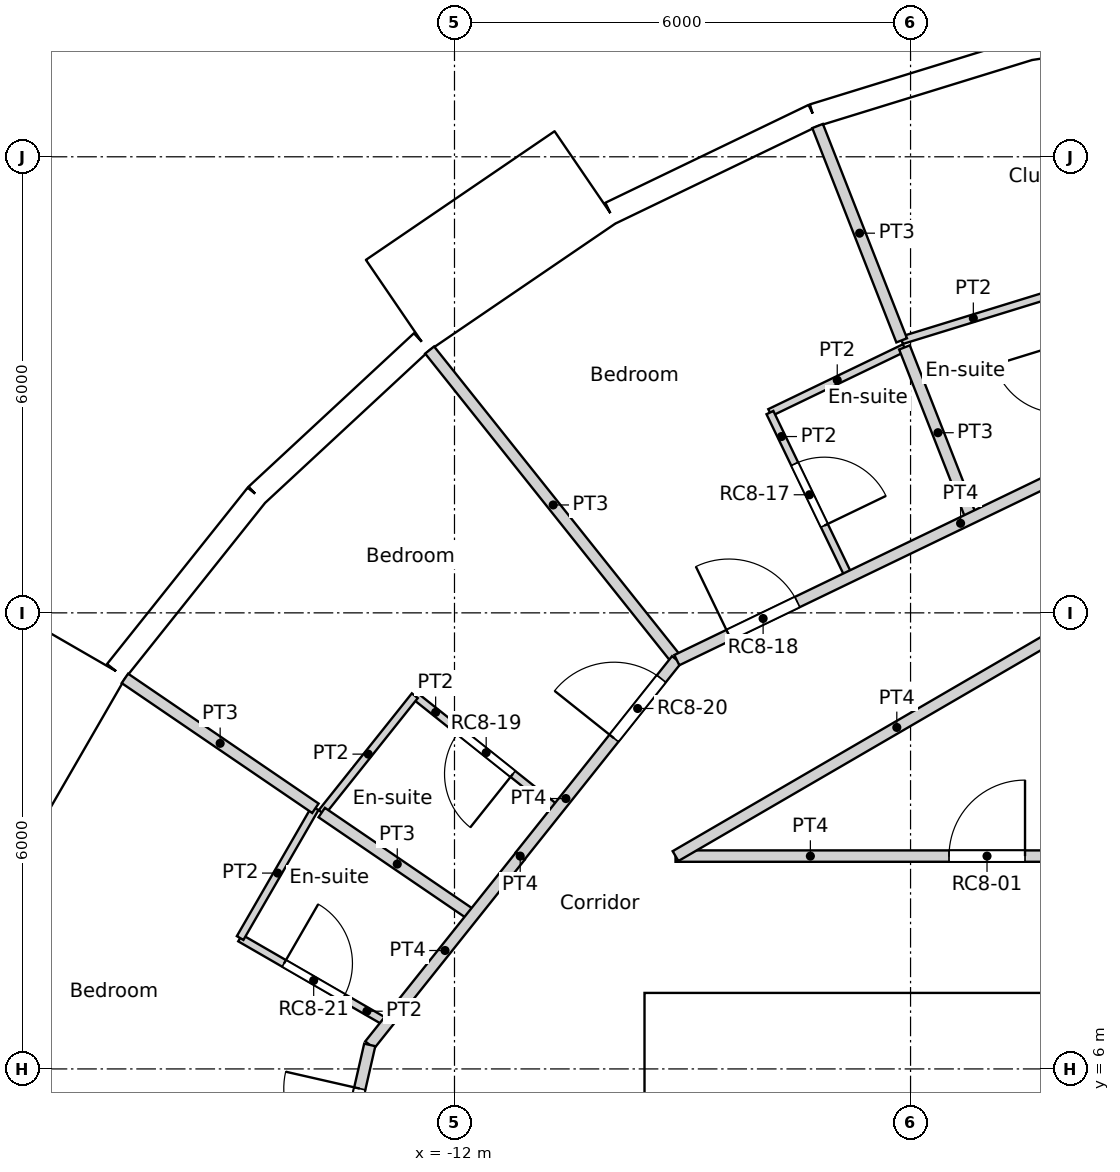
"""IFC4 building model, lengths in metres.
Left out: names, types, materials, properties, quantities, classifications, styles, units other than length and angle.
Written with IfcOpenShell. Run it as: python <this file> out.ifc"""

import sys

from ifc_helpers import new_model, si_unit, direction, frame, frame_2d, origin, origin_2d, place, context, subcontext, project, spatial, rectangle, circle, extrude, element, fill, save


model = new_model("IFC4")
c1 = context("Model", 3, precision=1e-05, world=origin(), true_north=direction((0.0, 1.0)))
c2 = subcontext(c1, "Body", "Model", "MODEL_VIEW")
j1 = project(units=[si_unit("LENGTHUNIT", "METRE"), si_unit("PLANEANGLEUNIT", "RADIAN")], contexts=[c1])
p1 = place(None, origin())
s1 = spatial("IfcSite", under=j1, at=p1, CompositionType="ELEMENT")
p2 = place(p1, origin())
s2 = spatial("IfcBuilding", under=s1, at=p2, CompositionType="ELEMENT")
p3 = place(p2, frame((0.0, 0.0, 305.4)))
s3 = spatial("IfcBuildingStorey", under=s2, at=p3, CompositionType="ELEMENT", Elevation=305.4)
for number, where, z_axis, x_axis in (
    (1, (-4.188, 18.35, 0.0), (0.0, 0.0, 1.0), (1.0, 0.0, 0.0)),
    (2, (-9.411, 16.301, 0.0), (0.0, 0.0, 1.0), (1.0, 0.0, 0.0)),
    (3, (-13.798, 12.802, 0.0), (0.0, 0.0, 1.0), (1.0, 0.0, 0.0)),
    (4, (-16.958, 8.167, 0.0), (0.0, 0.0, 1.0), (1.0, 0.0, 0.0)),
):
    element("IfcColumn", number, at=place(p3, frame(where, z_axis=z_axis, x_axis=x_axis)), inside=s3, PredefinedType="COLUMN", context=c2, shape_type="SweptSolid", body=[
        extrude(circle(Radius=0.45, at=origin_2d()), origin(), (0.0, 0.0, 1.0), 3.6),
    ])
p4 = place(p3, frame((-1.563, 20.436, -0.35), z_axis=(0.0, 0.0, 1.0), x_axis=(-0.988836445254, -0.149004981587, 0.0)))
e5 = element("IfcWall", 5, at=p4, inside=s3, PredefinedType="ELEMENTEDWALL", context=c2, shape_type="SweptSolid", body=[
    extrude(rectangle(XDim=3.0, YDim=1.45, at=frame_2d((1.5, 0.0))), origin(), (0.0, 0.0, 1.0), 3.6),
])
p5 = place(p4, frame((1.5, 0.0, 1.9)))
e6 = element("IfcOpeningElement", 6, at=p5, cuts=e5, PredefinedType="OPENING", context=c2, shape_type="SweptSolid", body=[
    extrude(circle(Radius=0.9, at=origin_2d()), frame((0.0, 0.735, 0.0), z_axis=(0.0, -1.0, 0.0), x_axis=(1.0, 0.0, 0.0)), (0.0, 0.0, 1.0), 1.47),
])
p6 = place(p3, frame((-4.448, 19.418, 0.0), z_axis=(0.0, 0.0, 1.0), x_axis=(-0.95558635705, -0.294711238707, 0.0)))
e7 = element("IfcWall", 7, at=p6, inside=s3, PredefinedType="SOLIDWALL", context=c2, shape_type="SweptSolid", body=[
    extrude(rectangle(XDim=2.962, YDim=0.3, at=frame_2d((1.481, 0.0))), origin(), (0.0, 0.0, 1.0), 2.8),
])
p7 = place(p6, frame((1.481, 0.0, 1.55)))
e8 = element("IfcOpeningElement", 8, at=p7, cuts=e7, PredefinedType="OPENING", context=c2, shape_type="SweptSolid", body=[
    extrude(circle(Radius=0.9, at=origin_2d()), frame((0.0, 0.16, 0.0), z_axis=(0.0, -1.0, 0.0), x_axis=(1.0, 0.0, 0.0)), (0.0, 0.0, 1.0), 0.32),
])
p8 = place(p3, frame((-7.278, 18.545, 0.0), z_axis=(0.0, 0.0, 1.0), x_axis=(-0.900939615635, -0.433944476838, 0.0)))
e9 = element("IfcWall", 9, at=p8, inside=s3, PredefinedType="SOLIDWALL", context=c2, shape_type="SweptSolid", body=[
    extrude(rectangle(XDim=2.962, YDim=0.3, at=frame_2d((1.481, 0.0))), origin(), (0.0, 0.0, 1.0), 3.25),
])
p9 = place(p8, frame((1.481, 0.0, 1.55)))
e10 = element("IfcOpeningElement", 10, at=p9, cuts=e9, PredefinedType="OPENING", context=c2, shape_type="SweptSolid", body=[
    extrude(circle(Radius=0.9, at=origin_2d()), frame((0.0, 0.16, 0.0), z_axis=(0.0, -1.0, 0.0), x_axis=(1.0, 0.0, 0.0)), (0.0, 0.0, 1.0), 0.32),
])
p10 = place(p3, frame((-10.275, 17.734, -0.35), z_axis=(0.0, 0.0, 1.0), x_axis=(-0.826246281157, -0.563309047392, 0.0)))
e11 = element("IfcWall", 11, at=p10, inside=s3, PredefinedType="ELEMENTEDWALL", context=c2, shape_type="SweptSolid", body=[
    extrude(rectangle(XDim=3.0, YDim=1.45, at=frame_2d((1.5, 0.0))), origin(), (0.0, 0.0, 1.0), 3.6),
])
p11 = place(p10, frame((1.5, 0.0, 1.9)))
e12 = element("IfcOpeningElement", 12, at=p11, cuts=e11, PredefinedType="OPENING", context=c2, shape_type="SweptSolid", body=[
    extrude(circle(Radius=0.9, at=origin_2d()), frame((0.0, 0.735, 0.0), z_axis=(0.0, -1.0, 0.0), x_axis=(1.0, 0.0, 0.0)), (0.0, 0.0, 1.0), 1.47),
])
p12 = place(p3, frame((-12.432, 15.565, 0.0), z_axis=(0.0, 0.0, 1.0), x_axis=(-0.733066412643, -0.680157066165, 0.0)))
e13 = element("IfcWall", 13, at=p12, inside=s3, PredefinedType="SOLIDWALL", context=c2, shape_type="SweptSolid", body=[
    extrude(rectangle(XDim=2.962, YDim=0.3, at=frame_2d((1.481, 0.0))), origin(), (0.0, 0.0, 1.0), 2.8),
])
p13 = place(p12, frame((1.481, 0.0, 1.55)))
e14 = element("IfcOpeningElement", 14, at=p13, cuts=e13, PredefinedType="OPENING", context=c2, shape_type="SweptSolid", body=[
    extrude(circle(Radius=0.9, at=origin_2d()), frame((0.0, 0.16, 0.0), z_axis=(0.0, -1.0, 0.0), x_axis=(1.0, 0.0, 0.0)), (0.0, 0.0, 1.0), 0.32),
])
p14 = place(p3, frame((-14.604, 13.55, 0.0), z_axis=(0.0, 0.0, 1.0), x_axis=(-0.623498236992, -0.781824755599, 0.0)))
e15 = element("IfcWall", 15, at=p14, inside=s3, PredefinedType="SOLIDWALL", context=c2, shape_type="SweptSolid", body=[
    extrude(rectangle(XDim=2.962, YDim=0.3, at=frame_2d((1.481, 0.0))), origin(), (0.0, 0.0, 1.0), 3.25),
])
p15 = place(p14, frame((1.481, 0.0, 1.55)))
e16 = element("IfcOpeningElement", 16, at=p15, cuts=e15, PredefinedType="OPENING", context=c2, shape_type="SweptSolid", body=[
    extrude(circle(Radius=0.9, at=origin_2d()), frame((0.0, 0.16, 0.0), z_axis=(0.0, -1.0, 0.0), x_axis=(1.0, 0.0, 0.0)), (0.0, 0.0, 1.0), 0.32),
])
p16 = place(p3, frame((-16.952, 11.52, -0.35), z_axis=(0.0, 0.0, 1.0), x_axis=(-0.499990139034, -0.866031096941, 0.0)))
e17 = element("IfcWall", 17, at=p16, inside=s3, PredefinedType="ELEMENTEDWALL", context=c2, shape_type="SweptSolid", body=[
    extrude(rectangle(XDim=3.0, YDim=1.45, at=frame_2d((1.5, 0.0))), origin(), (0.0, 0.0, 1.0), 3.6),
])
p17 = place(p16, frame((1.5, 0.0, 1.9)))
e18 = element("IfcOpeningElement", 18, at=p17, cuts=e17, PredefinedType="OPENING", context=c2, shape_type="SweptSolid", body=[
    extrude(circle(Radius=0.9, at=origin_2d()), frame((0.0, 0.735, 0.0), z_axis=(0.0, -1.0, 0.0), x_axis=(1.0, 0.0, 0.0)), (0.0, 0.0, 1.0), 1.47),
])
p18 = place(p3, frame((-9.5, 6.7, 0.0), z_axis=(0.0, 0.0, 1.0), x_axis=(1.0, 0.0, 0.0)))
e19 = element("IfcWall", 19, at=p18, inside=s3, PredefinedType="SOLIDWALL", context=c2, shape_type="SweptSolid", body=[
    extrude(rectangle(XDim=19.0, YDim=0.6, at=frame_2d((9.5, 0.0))), origin(), (0.0, 0.0, 1.0), 3.6),
])
p19 = place(p18, frame((5.35, 0.0, 0.0)))
e20 = element("IfcOpeningElement", 20, at=p19, cuts=e19, PredefinedType="OPENING", context=c2, shape_type="SweptSolid", body=[
    extrude(rectangle(XDim=1.7, YDim=2.1, at=frame_2d((0.85, 1.05))), frame((0.0, 0.3, 0.0), z_axis=(0.0, -1.0, 0.0), x_axis=(1.0, 0.0, 0.0)), (0.0, 0.0, 1.0), 0.6),
])
p20 = place(p3, frame((-9.2, -6.4, 0.0), z_axis=(0.0, 0.0, 1.0), x_axis=(0.0, 1.0, 0.0)))
e21 = element("IfcWall", 21, at=p20, inside=s3, PredefinedType="SOLIDWALL", context=c2, shape_type="SweptSolid", body=[
    extrude(rectangle(XDim=12.8, YDim=0.6, at=frame_2d((6.4, 0.0))), origin(), (0.0, 0.0, 1.0), 3.6),
])
p21 = place(p3, frame((-9.092, 8.8, 0.0), z_axis=(0.0, 0.0, 1.0), x_axis=(0.864470922103, 0.502682827277, 0.0)))
e22 = element("IfcWall", 22, at=p21, inside=s3, PredefinedType="PARTITIONING", context=c2, shape_type="SweptSolid", body=[
    extrude(rectangle(XDim=6.735, YDim=0.15, at=frame_2d((3.368, 0.0))), origin(), (0.0, 0.0, 1.0), 3.25),
])
p22 = place(p3, frame((-9.092, 8.8, 0.0), z_axis=(0.0, 0.0, 1.0), x_axis=(1.0, 0.0, 0.0)))
e23 = element("IfcWall", 23, at=p22, inside=s3, PredefinedType="PARTITIONING", context=c2, shape_type="SweptSolid", body=[
    extrude(rectangle(XDim=8.196, YDim=0.15, at=frame_2d((4.098, 0.0))), origin(), (0.0, 0.0, 1.0), 3.25),
])
p23 = place(p22, frame((3.598, 0.0, 0.0)))
e24 = element("IfcOpeningElement", 24, at=p23, cuts=e23, PredefinedType="OPENING", context=c2, shape_type="SweptSolid", body=[
    extrude(rectangle(XDim=1.0, YDim=2.04, at=frame_2d((0.5, 1.02))), frame((0.0, 0.075, 0.0), z_axis=(0.0, -1.0, 0.0), x_axis=(1.0, 0.0, 0.0)), (0.0, 0.0, 1.0), 0.15),
])
p24 = place(p3, frame((-11.136, 8.802, 0.0), z_axis=(0.0, 0.0, 1.0), x_axis=(0.623151397235, 0.782101231379, 0.0)))
e25 = element("IfcWall", 25, at=p24, inside=s3, PredefinedType="PARTITIONING", context=c2, shape_type="SweptSolid", body=[
    extrude(rectangle(XDim=3.301, YDim=0.15, at=frame_2d((1.65, 0.0))), origin(), (0.0, 0.0, 1.0), 3.25),
])
p25 = place(p24, frame((1.981, 0.0, 0.0)))
e26 = element("IfcOpeningElement", 26, at=p25, cuts=e25, PredefinedType="OPENING", context=c2, shape_type="SweptSolid", body=[
    extrude(rectangle(XDim=1.0, YDim=2.1, at=frame_2d((0.5, 1.05))), frame((0.0, 0.075, 0.0), z_axis=(0.0, -1.0, 0.0), x_axis=(1.0, 0.0, 0.0)), (0.0, 0.0, 1.0), 0.15),
])
p26 = place(p3, frame((-11.134, 8.8, 0.0), z_axis=(0.0, 0.0, 1.0), x_axis=(-1.0, 0.0, 0.0)))
e27 = element("IfcWall", 27, at=p26, inside=s3, PredefinedType="PARTITIONING", context=c2, shape_type="SweptSolid", body=[
    extrude(rectangle(XDim=0.003, YDim=0.15, at=frame_2d((0.001, 0.0))), origin(), (0.0, 0.0, 1.0), 3.25),
])
p27 = place(p3, frame((-9.075, 11.378, 0.0), z_axis=(0.0, 0.0, 1.0), x_axis=(0.900778421649, 0.434278983018, 0.0)))
e28 = element("IfcWall", 28, at=p27, inside=s3, PredefinedType="PARTITIONING", context=c2, shape_type="SweptSolid", body=[
    extrude(rectangle(XDim=6.479, YDim=0.15, at=frame_2d((3.239, 0.0))), origin(), (0.0, 0.0, 1.0), 3.25),
])
p28 = place(p27, frame((0.76, 0.0, 0.0)))
e29 = element("IfcOpeningElement", 29, at=p28, cuts=e28, PredefinedType="OPENING", context=c2, shape_type="SweptSolid", body=[
    extrude(rectangle(XDim=1.0, YDim=2.1, at=frame_2d((0.5, 1.05))), frame((0.0, 0.075, 0.0), z_axis=(0.0, -1.0, 0.0), x_axis=(1.0, 0.0, 0.0)), (0.0, 0.0, 1.0), 0.15),
])
p29 = place(p3, frame((-13.115, 6.316, 0.0), z_axis=(0.0, 0.0, 1.0), x_axis=(0.623560523309, 0.781775078761, 0.0)))
e30 = element("IfcWall", 30, at=p29, inside=s3, PredefinedType="PARTITIONING", context=c2, shape_type="SweptSolid", body=[
    extrude(rectangle(XDim=3.177, YDim=0.15, at=frame_2d((1.589, 0.0))), origin(), (0.0, 0.0, 1.0), 3.25),
])
p30 = place(p3, frame((-14.557, 0.0, 0.0), z_axis=(0.0, 0.0, 1.0), x_axis=(0.222533159771, 0.974925121639, 0.0)))
e31 = element("IfcWall", 31, at=p30, inside=s3, PredefinedType="PARTITIONING", context=c2, shape_type="SweptSolid", body=[
    extrude(rectangle(XDim=6.478, YDim=0.15, at=frame_2d((3.239, 0.0))), origin(), (0.0, 0.0, 1.0), 3.25),
])
p31 = place(p30, frame((4.889, 0.0, 0.0)))
e32 = element("IfcOpeningElement", 32, at=p31, cuts=e31, PredefinedType="OPENING", context=c2, shape_type="SweptSolid", body=[
    extrude(rectangle(XDim=1.0, YDim=2.1, at=frame_2d((0.5, 1.05))), frame((0.0, 0.075, 0.0), z_axis=(0.0, -1.0, 0.0), x_axis=(1.0, 0.0, 0.0)), (0.0, 0.0, 1.0), 0.15),
])
p32 = place(p30, frame((2.567, 0.0, 0.0)))
e33 = element("IfcOpeningElement", 33, at=p32, cuts=e31, PredefinedType="OPENING", context=c2, shape_type="SweptSolid", body=[
    extrude(rectangle(XDim=1.0, YDim=2.1, at=frame_2d((0.5, 1.05))), frame((0.0, 0.075, 0.0), z_axis=(0.0, -1.0, 0.0), x_axis=(1.0, 0.0, 0.0)), (0.0, 0.0, 1.0), 0.15),
])
p33 = place(p3, frame((-6.117, 15.585, 0.0), z_axis=(0.0, 0.0, 1.0), x_axis=(0.955671951668, 0.294433559219, 0.0)))
e34 = element("IfcWall", 34, at=p33, inside=s3, PredefinedType="PARTITIONING", context=c2, shape_type="SweptSolid", body=[
    extrude(rectangle(XDim=1.973, YDim=0.1, at=frame_2d((0.987, 0.0))), origin(), (0.0, 0.0, 1.0), 3.25),
])
p34 = place(p3, frame((-7.223, 18.405, 0.0), z_axis=(0.0, 0.0, 1.0), x_axis=(0.365101225584, -0.93096782709, 0.0)))
e35 = element("IfcWall", 35, at=p34, inside=s3, PredefinedType="PARTITIONING", context=c2, shape_type="SweptSolid", body=[
    extrude(rectangle(XDim=3.029, YDim=0.15, at=frame_2d((1.515, 0.0))), origin(), (0.0, 0.0, 1.0), 3.25),
])
p35 = place(p3, frame((-6.08, 15.492, 0.0), z_axis=(0.0, 0.0, 1.0), x_axis=(0.36549883342, -0.930811797717, 0.0)))
e36 = element("IfcWall", 36, at=p35, inside=s3, PredefinedType="PARTITIONING", context=c2, shape_type="SweptSolid", body=[
    extrude(rectangle(XDim=2.411, YDim=0.15, at=frame_2d((1.205, 0.0))), origin(), (0.0, 0.0, 1.0), 3.25),
])
p36 = place(p3, frame((-7.85, 14.635, 0.0), z_axis=(0.0, 0.0, 1.0), x_axis=(0.900936932599, 0.433950047216, 0.0)))
e37 = element("IfcWall", 37, at=p36, inside=s3, PredefinedType="PARTITIONING", context=c2, shape_type="SweptSolid", body=[
    extrude(rectangle(XDim=1.966, YDim=0.1, at=frame_2d((0.983, 0.0))), origin(), (0.0, 0.0, 1.0), 3.25),
])
p37 = place(p3, frame((-7.85, 14.635, 0.0), z_axis=(0.0, 0.0, 1.0), x_axis=(0.433815618773, -0.901001669759, 0.0)))
e38 = element("IfcWall", 38, at=p37, inside=s3, PredefinedType="PARTITIONING", context=c2, shape_type="SweptSolid", body=[
    extrude(rectangle(XDim=2.4, YDim=0.1, at=frame_2d((1.2, 0.0))), origin(), (0.0, 0.0, 1.0), 3.25),
])
p38 = place(p37, frame((0.75, 0.0, 0.0)))
e39 = element("IfcOpeningElement", 39, at=p38, cuts=e38, PredefinedType="OPENING", context=c2, shape_type="SweptSolid", body=[
    extrude(rectangle(XDim=0.9, YDim=2.04, at=frame_2d((0.45, 1.02))), frame((0.0, 0.05, 0.0), z_axis=(0.0, -1.0, 0.0), x_axis=(1.0, 0.0, 0.0)), (0.0, 0.0, 1.0), 0.1),
])
p39 = place(p3, frame((-12.327, 15.458, 0.0), z_axis=(0.0, 0.0, 1.0), x_axis=(0.623460949534, -0.781854490558, 0.0)))
e40 = element("IfcWall", 40, at=p39, inside=s3, PredefinedType="PARTITIONING", context=c2, shape_type="SweptSolid", body=[
    extrude(rectangle(XDim=5.214, YDim=0.15, at=frame_2d((2.607, 0.0))), origin(), (0.0, 0.0, 1.0), 3.25),
])
p40 = place(p3, frame((-12.522, 10.91, 0.0), z_axis=(0.0, 0.0, 1.0), x_axis=(0.781830263661, -0.623491330191, 0.0)))
e41 = element("IfcWall", 41, at=p40, inside=s3, PredefinedType="PARTITIONING", context=c2, shape_type="SweptSolid", body=[
    extrude(rectangle(XDim=2.401, YDim=0.1, at=frame_2d((1.2, 0.0))), origin(), (0.0, 0.0, 1.0), 3.25),
])
p41 = place(p40, frame((0.751, 0.0, 0.0)))
e42 = element("IfcOpeningElement", 42, at=p41, cuts=e41, PredefinedType="OPENING", context=c2, shape_type="SweptSolid", body=[
    extrude(rectangle(XDim=0.9, YDim=2.04, at=frame_2d((0.45, 1.02))), frame((0.0, 0.05, 0.0), z_axis=(0.0, -1.0, 0.0), x_axis=(1.0, 0.0, 0.0)), (0.0, 0.0, 1.0), 0.1),
])
p42 = place(p3, frame((-13.747, 9.373, 0.0), z_axis=(0.0, 0.0, 1.0), x_axis=(0.623330716607, 0.781958322249, 0.0)))
e43 = element("IfcWall", 43, at=p42, inside=s3, PredefinedType="PARTITIONING", context=c2, shape_type="SweptSolid", body=[
    extrude(rectangle(XDim=1.965, YDim=0.1, at=frame_2d((0.983, 0.0))), origin(), (0.0, 0.0, 1.0), 3.25),
])
p43 = place(p3, frame((-16.336, 11.138, 0.0), z_axis=(0.0, 0.0, 1.0), x_axis=(0.826159220299, -0.563436724678, 0.0)))
e44 = element("IfcWall", 44, at=p43, inside=s3, PredefinedType="PARTITIONING", context=c2, shape_type="SweptSolid", body=[
    extrude(rectangle(XDim=3.033, YDim=0.15, at=frame_2d((1.517, 0.0))), origin(), (0.0, 0.0, 1.0), 3.25),
])
p44 = place(p3, frame((-13.747, 9.373, 0.0), z_axis=(0.0, 0.0, 1.0), x_axis=(0.826135036312, -0.563472183677, 0.0)))
e45 = element("IfcWall", 45, at=p44, inside=s3, PredefinedType="PARTITIONING", context=c2, shape_type="SweptSolid", body=[
    extrude(rectangle(XDim=2.406, YDim=0.15, at=frame_2d((1.203, 0.0))), origin(), (0.0, 0.0, 1.0), 3.25),
])
p45 = place(p3, frame((-14.82, 7.722, 0.0), z_axis=(0.0, 0.0, 1.0), x_axis=(0.500143626598, 0.865942465048, 0.0)))
e46 = element("IfcWall", 46, at=p45, inside=s3, PredefinedType="PARTITIONING", context=c2, shape_type="SweptSolid", body=[
    extrude(rectangle(XDim=1.974, YDim=0.1, at=frame_2d((0.987, 0.0))), origin(), (0.0, 0.0, 1.0), 3.25),
])
p46 = place(p3, frame((-14.82, 7.722, 0.0), z_axis=(0.0, 0.0, 1.0), x_axis=(0.866076416361, -0.499911633214, 0.0)))
e47 = element("IfcWall", 47, at=p46, inside=s3, PredefinedType="PARTITIONING", context=c2, shape_type="SweptSolid", body=[
    extrude(rectangle(XDim=2.234, YDim=0.1, at=frame_2d((1.117, 0.0))), origin(), (0.0, 0.0, 1.0), 3.25),
])
p47 = place(p46, frame((0.667, 0.0, 0.0)))
e48 = element("IfcOpeningElement", 48, at=p47, cuts=e47, PredefinedType="OPENING", context=c2, shape_type="SweptSolid", body=[
    extrude(rectangle(XDim=0.9, YDim=2.04, at=frame_2d((0.45, 1.02))), frame((0.0, 0.05, 0.0), z_axis=(0.0, -1.0, 0.0), x_axis=(1.0, 0.0, 0.0)), (0.0, 0.0, 1.0), 0.1),
])
p48 = place(p3, frame((-18.893, 5.828, 0.0), z_axis=(0.0, 0.0, 1.0), x_axis=(0.955580602693, -0.294729896274, 0.0)))
e49 = element("IfcWall", 49, at=p48, inside=s3, PredefinedType="PARTITIONING", context=c2, shape_type="SweptSolid", body=[
    extrude(rectangle(XDim=5.54, YDim=0.15, at=frame_2d((2.77, 0.0))), origin(), (0.0, 0.0, 1.0), 3.25),
])
p49 = place(p7, origin())
e50 = element("IfcWindow", 50, at=p49, inside=s3, PartitioningType="SINGLE_PANEL", PredefinedType="WINDOW", context=c2, shape_type="SweptSolid", body=[
    extrude(circle(Radius=0.9, at=origin_2d()), frame((0.0, 0.12, 0.0), z_axis=(0.0, -1.0, 0.0), x_axis=(1.0, 0.0, 0.0)), (0.0, 0.0, 1.0), 0.1),
])
fill(e8, e50)
p50 = place(p9, origin())
e51 = element("IfcWindow", 51, at=p50, inside=s3, PartitioningType="SINGLE_PANEL", PredefinedType="WINDOW", context=c2, shape_type="SweptSolid", body=[
    extrude(circle(Radius=0.9, at=origin_2d()), frame((0.0, 0.12, 0.0), z_axis=(0.0, -1.0, 0.0), x_axis=(1.0, 0.0, 0.0)), (0.0, 0.0, 1.0), 0.1),
])
fill(e10, e51)
p51 = place(p11, origin())
e52 = element("IfcWindow", 52, at=p51, inside=s3, PartitioningType="SINGLE_PANEL", PredefinedType="WINDOW", context=c2, shape_type="SweptSolid", body=[
    extrude(circle(Radius=0.9, at=origin_2d()), frame((0.0, 0.695, 0.0), z_axis=(0.0, -1.0, 0.0), x_axis=(1.0, 0.0, 0.0)), (0.0, 0.0, 1.0), 0.1),
])
fill(e12, e52)
p52 = place(p13, origin())
e53 = element("IfcWindow", 53, at=p52, inside=s3, PartitioningType="SINGLE_PANEL", PredefinedType="WINDOW", context=c2, shape_type="SweptSolid", body=[
    extrude(circle(Radius=0.9, at=origin_2d()), frame((0.0, 0.12, 0.0), z_axis=(0.0, -1.0, 0.0), x_axis=(1.0, 0.0, 0.0)), (0.0, 0.0, 1.0), 0.1),
])
fill(e14, e53)
p53 = place(p15, origin())
e54 = element("IfcWindow", 54, at=p53, inside=s3, PartitioningType="SINGLE_PANEL", PredefinedType="WINDOW", context=c2, shape_type="SweptSolid", body=[
    extrude(circle(Radius=0.9, at=origin_2d()), frame((0.0, 0.12, 0.0), z_axis=(0.0, -1.0, 0.0), x_axis=(1.0, 0.0, 0.0)), (0.0, 0.0, 1.0), 0.1),
])
fill(e16, e54)
p54 = place(p17, origin())
e55 = element("IfcWindow", 55, at=p54, inside=s3, PartitioningType="SINGLE_PANEL", PredefinedType="WINDOW", context=c2, shape_type="SweptSolid", body=[
    extrude(circle(Radius=0.9, at=origin_2d()), frame((0.0, 0.695, 0.0), z_axis=(0.0, -1.0, 0.0), x_axis=(1.0, 0.0, 0.0)), (0.0, 0.0, 1.0), 0.1),
])
fill(e18, e55)
p55 = place(p23, origin())
e56 = element("IfcDoor", 56, at=p55, inside=s3, OperationType="SINGLE_SWING_RIGHT", PredefinedType="DOOR", context=c2, shape_type="SweptSolid", body=[
    extrude(rectangle(XDim=1.0, YDim=2.04, at=frame_2d((0.5, 1.02))), frame((0.0, 0.025, 0.0), z_axis=(0.0, -1.0, 0.0), x_axis=(1.0, 0.0, 0.0)), (0.0, 0.0, 1.0), 0.05),
])
fill(e24, e56)
p56 = place(p38, origin())
e57 = element("IfcDoor", 57, at=p56, inside=s3, OperationType="SINGLE_SWING_RIGHT", PredefinedType="DOOR", context=c2, shape_type="SweptSolid", body=[
    extrude(rectangle(XDim=0.9, YDim=2.04, at=frame_2d((0.45, 1.02))), frame((0.0, 0.025, 0.0), z_axis=(0.0, -1.0, 0.0), x_axis=(1.0, 0.0, 0.0)), (0.0, 0.0, 1.0), 0.05),
])
fill(e39, e57)
p57 = place(p28, origin())
e58 = element("IfcDoor", 58, at=p57, inside=s3, OperationType="SINGLE_SWING_LEFT", PredefinedType="DOOR", context=c2, shape_type="SweptSolid", body=[
    extrude(rectangle(XDim=1.0, YDim=2.1, at=frame_2d((0.5, 1.05))), frame((0.0, 0.025, 0.0), z_axis=(0.0, -1.0, 0.0), x_axis=(1.0, 0.0, 0.0)), (0.0, 0.0, 1.0), 0.05),
])
fill(e29, e58)
p58 = place(p41, origin())
e59 = element("IfcDoor", 59, at=p58, inside=s3, OperationType="SINGLE_SWING_LEFT", PredefinedType="DOOR", context=c2, shape_type="SweptSolid", body=[
    extrude(rectangle(XDim=0.9, YDim=2.04, at=frame_2d((0.45, 1.02))), frame((0.0, 0.025, 0.0), z_axis=(0.0, -1.0, 0.0), x_axis=(1.0, 0.0, 0.0)), (0.0, 0.0, 1.0), 0.05),
])
fill(e42, e59)
p59 = place(p25, origin())
e60 = element("IfcDoor", 60, at=p59, inside=s3, OperationType="SINGLE_SWING_LEFT", PredefinedType="DOOR", context=c2, shape_type="SweptSolid", body=[
    extrude(rectangle(XDim=1.0, YDim=2.1, at=frame_2d((0.5, 1.05))), frame((0.0, 0.025, 0.0), z_axis=(0.0, -1.0, 0.0), x_axis=(1.0, 0.0, 0.0)), (0.0, 0.0, 1.0), 0.05),
])
fill(e26, e60)
p60 = place(p47, origin())
e61 = element("IfcDoor", 61, at=p60, inside=s3, OperationType="SINGLE_SWING_LEFT", PredefinedType="DOOR", context=c2, shape_type="SweptSolid", body=[
    extrude(rectangle(XDim=0.9, YDim=2.04, at=frame_2d((0.45, 1.02))), frame((0.0, 0.025, 0.0), z_axis=(0.0, -1.0, 0.0), x_axis=(1.0, 0.0, 0.0)), (0.0, 0.0, 1.0), 0.05),
])
fill(e48, e61)
p61 = place(p31, origin())
e62 = element("IfcDoor", 62, at=p61, inside=s3, OperationType="SINGLE_SWING_RIGHT", PredefinedType="DOOR", context=c2, shape_type="SweptSolid", body=[
    extrude(rectangle(XDim=1.0, YDim=2.1, at=frame_2d((0.5, 1.05))), frame((0.0, 0.025, 0.0), z_axis=(0.0, -1.0, 0.0), x_axis=(1.0, 0.0, 0.0)), (0.0, 0.0, 1.0), 0.05),
])
fill(e32, e62)
save(model, sys.argv[1])
